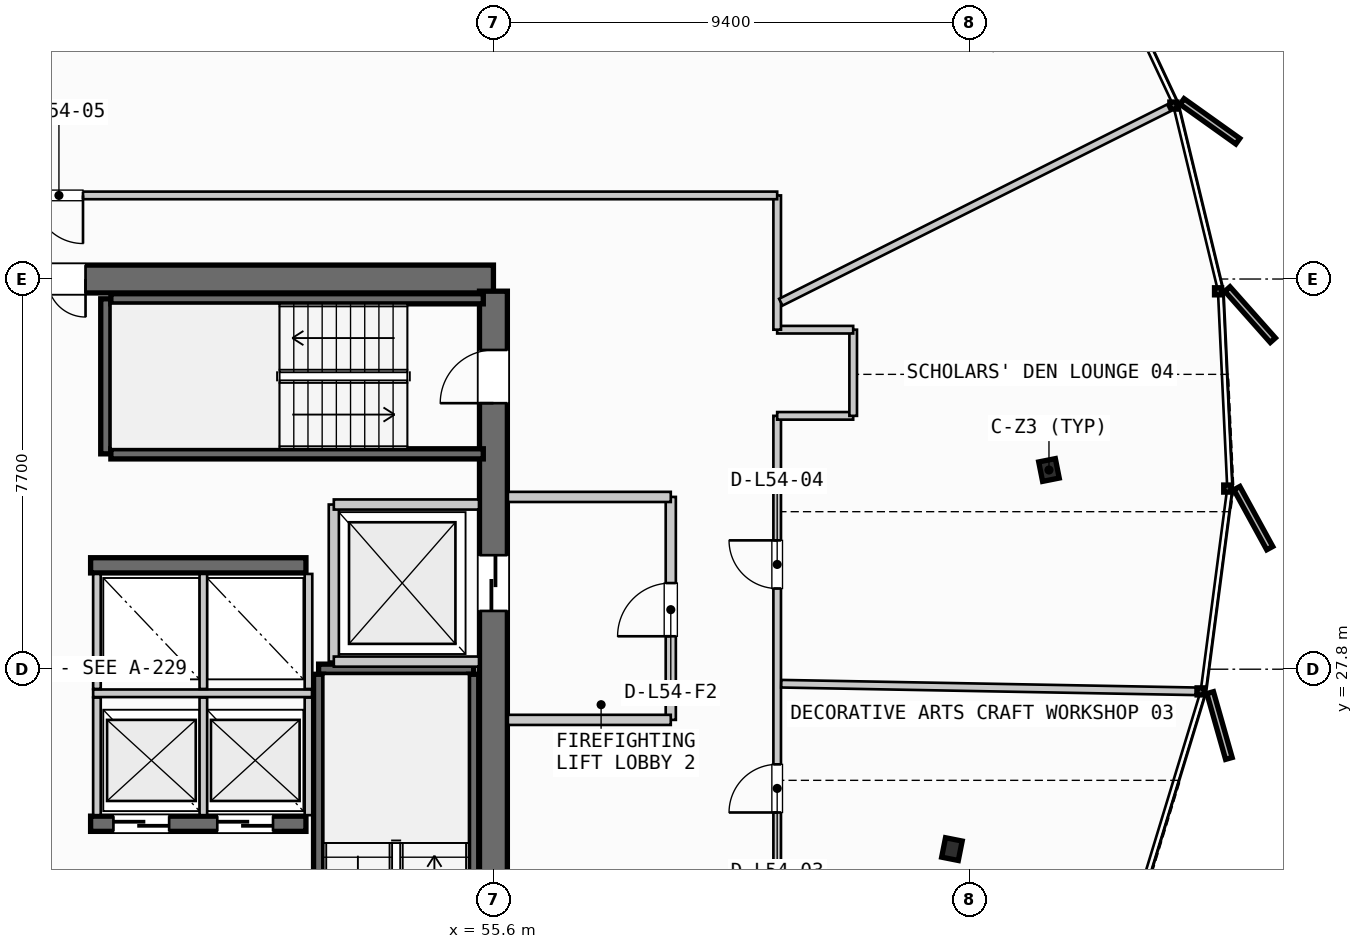
"""IFC4 building model, lengths in metres.
Left out: names, types, materials, properties, quantities, classifications, styles, units other than length and angle.
Written with IfcOpenShell. Run it as: python <this file> out.ifc"""

import sys

from ifc_helpers import new_model, si_unit, direction, frame, frame_2d, origin, origin_2d, place, context, subcontext, project, spatial, rectangle, i_section, extrude, source, transform, mapped, element, fill, save


model = new_model("IFC4")
c1 = context("Model", 3, precision=1e-05, world=origin(), true_north=direction((0.0, 1.0)))
c2 = subcontext(c1, "Body", "Model", "MODEL_VIEW")
j1 = project(units=[si_unit("LENGTHUNIT", "METRE"), si_unit("PLANEANGLEUNIT", "RADIAN")], contexts=[c1])
p1 = place(None, origin())
s1 = spatial("IfcSite", under=j1, at=p1, CompositionType="ELEMENT")
p2 = place(p1, origin())
s2 = spatial("IfcBuilding", under=s1, at=p2, CompositionType="ELEMENT")
p3 = place(p2, frame((0.0, 0.0, 207.9)))
s3 = spatial("IfcBuildingStorey", under=s2, at=p3, CompositionType="ELEMENT", Elevation=207.9)
p4 = place(p3, frame((55.6, 35.5, 0.0), z_axis=(0.0, 0.0, 1.0), x_axis=(-1.0, 0.0, 0.0)))
e1 = element("IfcWall", 1, at=p4, inside=s3, PredefinedType="SHEAR", context=c2, shape_type="SweptSolid", body=[
    extrude(rectangle(XDim=17.6, YDim=0.55, at=frame_2d((8.8, 0.0))), origin(), (0.0, 0.0, 1.0), 3.26),
])
p5 = place(p4, frame((8.05, 0.0, 0.0)))
e2 = element("IfcOpeningElement", 2, at=p5, cuts=e1, PredefinedType="OPENING", context=c2, shape_type="SweptSolid", body=[
    extrude(rectangle(XDim=1.5, YDim=2.2, at=frame_2d((0.75, 1.1))), frame((0.0, 0.285, 0.0), z_axis=(0.0, -1.0, 0.0), x_axis=(1.0, 0.0, 0.0)), (0.0, 0.0, 1.0), 0.57),
])
p6 = place(p4, frame((15.85, 0.0, 0.0)))
e3 = element("IfcOpeningElement", 3, at=p6, cuts=e1, PredefinedType="OPENING", context=c2, shape_type="SweptSolid", body=[
    extrude(rectangle(XDim=0.85, YDim=2.15, at=frame_2d((0.425, 1.075))), frame((0.0, 0.285, 0.0), z_axis=(0.0, -1.0, 0.0), x_axis=(1.0, 0.0, 0.0)), (0.0, 0.0, 1.0), 0.57),
])
p7 = place(p4, frame((14.35, 0.0, 0.0)))
e4 = element("IfcOpeningElement", 4, at=p7, cuts=e1, PredefinedType="OPENING", context=c2, shape_type="SweptSolid", body=[
    extrude(rectangle(XDim=0.85, YDim=2.15, at=frame_2d((0.425, 1.075))), frame((0.0, 0.285, 0.0), z_axis=(0.0, -1.0, 0.0), x_axis=(1.0, 0.0, 0.0)), (0.0, 0.0, 1.0), 0.57),
])
p8 = place(p4, frame((12.3, 0.0, 0.0)))
e5 = element("IfcOpeningElement", 5, at=p8, cuts=e1, PredefinedType="OPENING", context=c2, shape_type="SweptSolid", body=[
    extrude(rectangle(XDim=0.95, YDim=2.15, at=frame_2d((0.475, 1.075))), frame((0.0, 0.285, 0.0), z_axis=(0.0, -1.0, 0.0), x_axis=(1.0, 0.0, 0.0)), (0.0, 0.0, 1.0), 0.57),
])
p9 = place(p4, frame((10.2, 0.0, 0.0)))
e6 = element("IfcOpeningElement", 6, at=p9, cuts=e1, PredefinedType="OPENING", context=c2, shape_type="SweptSolid", body=[
    extrude(rectangle(XDim=0.9, YDim=2.15, at=frame_2d((0.45, 1.075))), frame((0.0, 0.285, 0.0), z_axis=(0.0, -1.0, 0.0), x_axis=(1.0, 0.0, 0.0)), (0.0, 0.0, 1.0), 0.57),
])
p10 = place(p3, frame((55.6, 20.34, 0.0), z_axis=(0.0, 0.0, 1.0), x_axis=(0.0, 1.0, 0.0)))
e7 = element("IfcWall", 7, at=p10, inside=s3, PredefinedType="SHEAR", context=c2, shape_type="SweptSolid", body=[
    extrude(rectangle(XDim=14.92, YDim=0.55, at=frame_2d((7.46, 0.0))), origin(), (0.0, 0.0, 1.0), 3.26),
])
p11 = place(p10, frame((12.71, 0.0, 0.0)))
e8 = element("IfcOpeningElement", 8, at=p11, cuts=e7, PredefinedType="OPENING", context=c2, shape_type="SweptSolid", body=[
    extrude(rectangle(XDim=1.05, YDim=2.15, at=frame_2d((0.525, 1.075))), frame((0.0, 0.285, 0.0), z_axis=(0.0, -1.0, 0.0), x_axis=(1.0, 0.0, 0.0)), (0.0, 0.0, 1.0), 0.57),
])
p12 = place(p10, frame((8.61, 0.0, 0.0)))
e9 = element("IfcOpeningElement", 9, at=p12, cuts=e7, PredefinedType="OPENING", context=c2, shape_type="SweptSolid", body=[
    extrude(rectangle(XDim=1.1, YDim=2.2, at=frame_2d((0.55, 1.1))), frame((0.0, 0.285, 0.0), z_axis=(0.0, -1.0, 0.0), x_axis=(1.0, 0.0, 0.0)), (0.0, 0.0, 1.0), 0.57),
])
p13 = place(p3, frame((47.65, 24.75, 0.0), z_axis=(0.0, 0.0, 1.0), x_axis=(1.0, 0.0, 0.0)))
e10 = element("IfcWall", 10, at=p13, inside=s3, PredefinedType="SHEAR", context=c2, shape_type="SweptSolid", body=[
    extrude(rectangle(XDim=4.25, YDim=0.3, at=frame_2d((2.125, 0.0))), origin(), (0.0, 0.0, 1.0), 3.26),
])
p14 = place(p13, frame((0.45, 0.0, 0.0)))
e11 = element("IfcOpeningElement", 11, at=p14, cuts=e10, PredefinedType="OPENING", context=c2, shape_type="SweptSolid", body=[
    extrude(rectangle(XDim=1.1, YDim=2.2, at=frame_2d((0.55, 1.1))), frame((0.0, 0.16, 0.0), z_axis=(0.0, -1.0, 0.0), x_axis=(1.0, 0.0, 0.0)), (0.0, 0.0, 1.0), 0.32),
])
p15 = place(p13, frame((2.5, 0.0, 0.0)))
e12 = element("IfcOpeningElement", 12, at=p15, cuts=e10, PredefinedType="OPENING", context=c2, shape_type="SweptSolid", body=[
    extrude(rectangle(XDim=1.1, YDim=2.2, at=frame_2d((0.55, 1.1))), frame((0.0, 0.16, 0.0), z_axis=(0.0, -1.0, 0.0), x_axis=(1.0, 0.0, 0.0)), (0.0, 0.0, 1.0), 0.32),
])
p16 = place(p3, frame((47.65, 29.85, 0.0), z_axis=(0.0, 0.0, 1.0), x_axis=(1.0, 0.0, 0.0)))
e13 = element("IfcWall", 13, at=p16, inside=s3, PredefinedType="SHEAR", context=c2, shape_type="SweptSolid", body=[
    extrude(rectangle(XDim=4.25, YDim=0.3, at=frame_2d((2.125, 0.0))), origin(), (0.0, 0.0, 1.0), 3.26),
])
m1 = source(origin(), c2, "Body", "SweptSolid", [
    extrude(i_section(OverallWidth=0.391, OverallDepth=0.335, WebThickness=0.023, FlangeThickness=0.034, FilletRadius=0.015, at=origin_2d()), origin(), (0.0, 0.0, 1.0), 3.26),
])
for number, where, z_axis, x_axis in (
    (14, (66.564, 31.731, 0.0), (0.0, 0.0, 1.0), (0.981, 0.195, 0.0)),
    (15, (64.649, 24.25, 0.0), (0.0, 0.0, 1.0), (0.981, -0.195, 0.0)),
):
    element("IfcColumn", number, at=place(p3, frame(where, z_axis=z_axis, x_axis=x_axis)), inside=s3, PredefinedType="COLUMN", context=c2, shape_type="MappedRepresentation", body=[
        mapped(m1, transform((0.0, 0.0, 0.0), scale=1.0)),
    ])
p17 = place(p3, frame((52.15, 27.8, 0.0), z_axis=(0.0, 0.0, 1.0), x_axis=(1.0, 0.0, 0.0)))
e16 = element("IfcWall", 16, at=p17, inside=s3, PredefinedType="SHEAR", context=c2, shape_type="SweptSolid", body=[
    extrude(rectangle(XDim=3.06, YDim=0.2, at=frame_2d((1.53, 0.0))), origin(), (0.0, 0.0, 1.0), 3.26),
])
for number, where, z_axis, x_axis in (
    (17, (55.21, 27.7, 0.0), (0.0, 0.0, 1.0), (0.0, -1.0, 0.0)),
    (18, (52.15, 20.35, 0.0), (0.0, 0.0, 1.0), (0.0, 1.0, 0.0)),
):
    element("IfcWall", number, at=place(p3, frame(where, z_axis=z_axis, x_axis=x_axis)), inside=s3, PredefinedType="SHEAR", context=c2, shape_type="SweptSolid", body=[
        extrude(rectangle(XDim=7.35, YDim=0.2, at=frame_2d((3.675, 0.0))), origin(), (0.0, 0.0, 1.0), 3.26),
    ])
p18 = place(p3, frame((47.95, 32.05, 0.0), z_axis=(0.0, 0.0, 1.0), x_axis=(0.0, 1.0, 0.0)))
e19 = element("IfcWall", 19, at=p18, inside=s3, PredefinedType="SHEAR", context=c2, shape_type="SweptSolid", body=[
    extrude(rectangle(XDim=3.06, YDim=0.2, at=frame_2d((1.53, 0.0))), origin(), (0.0, 0.0, 1.0), 3.26),
])
for number, where, z_axis, x_axis in (
    (20, (48.05, 35.11, 0.0), (0.0, 0.0, 1.0), (1.0, 0.0, 0.0)),
    (21, (55.4, 32.05, 0.0), (0.0, 0.0, 1.0), (-1.0, 0.0, 0.0)),
):
    element("IfcWall", number, at=place(p3, frame(where, z_axis=z_axis, x_axis=x_axis)), inside=s3, PredefinedType="SHEAR", context=c2, shape_type="SweptSolid", body=[
        extrude(rectangle(XDim=7.35, YDim=0.2, at=frame_2d((3.675, 0.0))), origin(), (0.0, 0.0, 1.0), 3.26),
    ])
p19 = place(p3, frame((52.45, 27.95, 0.0), z_axis=(0.0, 0.0, 1.0), x_axis=(0.0, 1.0, 0.0)))
e22 = element("IfcWall", 22, at=p19, inside=s3, PredefinedType="PARTITIONING", context=c2, shape_type="SweptSolid", body=[
    extrude(rectangle(XDim=3.1, YDim=0.2, at=frame_2d((1.55, 0.0))), origin(), (0.0, 0.0, 1.0), 2.455),
])
for number, where, z_axis, x_axis in (
    (23, (52.45, 27.95, 0.0), (0.0, 0.0, 1.0), (1.0, 0.0, 0.0)),
    (24, (52.45, 31.05, 0.0), (0.0, 0.0, 1.0), (1.0, 0.0, 0.0)),
):
    element("IfcWall", number, at=place(p3, frame(where, z_axis=z_axis, x_axis=x_axis)), inside=s3, PredefinedType="PARTITIONING", context=c2, shape_type="SweptSolid", body=[
        extrude(rectangle(XDim=2.865, YDim=0.2, at=frame_2d((1.433, 0.0))), origin(), (0.0, 0.0, 1.0), 2.455),
    ])
p20 = place(p3, frame((59.1, 26.8, 0.0), z_axis=(0.0, 0.0, 1.0), x_axis=(0.0, 1.0, 0.0)))
e25 = element("IfcWall", 25, at=p20, inside=s3, PredefinedType="PARTITIONING", context=c2, shape_type="SweptSolid", body=[
    extrude(rectangle(XDim=4.4, YDim=0.2, at=frame_2d((2.2, 0.0))), origin(), (0.0, 0.0, 1.0), 2.455),
])
p21 = place(p20, frame((1.65, 0.0, 0.0)))
e26 = element("IfcOpeningElement", 26, at=p21, cuts=e25, PredefinedType="OPENING", context=c2, shape_type="SweptSolid", body=[
    extrude(rectangle(XDim=1.05, YDim=2.15, at=frame_2d((0.525, 1.075))), frame((0.0, 0.11, 0.0), z_axis=(0.0, -1.0, 0.0), x_axis=(1.0, 0.0, 0.0)), (0.0, 0.0, 1.0), 0.22),
])
for number, where, z_axis, x_axis in (
    (27, (55.885, 26.8, 0.0), (0.0, 0.0, 1.0), (1.0, 0.0, 0.0)),
    (28, (55.885, 31.2, 0.0), (0.0, 0.0, 1.0), (1.0, 0.0, 0.0)),
):
    element("IfcWall", number, at=place(p3, frame(where, z_axis=z_axis, x_axis=x_axis)), inside=s3, PredefinedType="PARTITIONING", context=c2, shape_type="SweptSolid", body=[
        extrude(rectangle(XDim=3.215, YDim=0.2, at=frame_2d((1.607, 0.0))), origin(), (0.0, 0.0, 1.0), 2.455),
    ])
p22 = place(p3, frame((47.7, 27.325, 0.0), z_axis=(0.0, 0.0, 1.0), x_axis=(1.0, 0.0, 0.0)))
e29 = element("IfcWall", 29, at=p22, inside=s3, PredefinedType="PARTITIONING", context=c2, shape_type="SweptSolid", body=[
    extrude(rectangle(XDim=4.32, YDim=0.15, at=frame_2d((2.16, 0.0))), origin(), (0.0, 0.0, 1.0), 2.455),
])
for number, where, z_axis, x_axis in (
    (30, (47.775, 24.92, 0.0), (0.0, 0.0, 1.0), (0.0, 1.0, 0.0)),
    (31, (49.875, 24.92, 0.0), (0.0, 0.0, 1.0), (0.0, 1.0, 0.0)),
    (32, (51.95, 24.92, 0.0), (0.0, 0.0, 1.0), (0.0, 1.0, 0.0)),
):
    element("IfcWall", number, at=place(p3, frame(where, z_axis=z_axis, x_axis=x_axis)), inside=s3, PredefinedType="PARTITIONING", context=c2, shape_type="SweptSolid", body=[
        extrude(rectangle(XDim=2.32, YDim=0.15, at=frame_2d((1.16, 0.0))), origin(), (0.0, 0.0, 1.0), 2.455),
    ])
for number, where, z_axis, x_axis in (
    (33, (47.775, 27.41, 0.0), (0.0, 0.0, 1.0), (0.0, 1.0, 0.0)),
    (34, (49.875, 27.41, 0.0), (0.0, 0.0, 1.0), (0.0, 1.0, 0.0)),
    (35, (51.95, 27.41, 0.0), (0.0, 0.0, 1.0), (0.0, 1.0, 0.0)),
):
    element("IfcWall", number, at=place(p3, frame(where, z_axis=z_axis, x_axis=x_axis)), inside=s3, PredefinedType="PARTITIONING", context=c2, shape_type="SweptSolid", body=[
        extrude(rectangle(XDim=2.27, YDim=0.15, at=frame_2d((1.135, 0.0))), origin(), (0.0, 0.0, 1.0), 2.455),
    ])
p23 = place(p3, frame((61.2, 22.8, 0.0), z_axis=(0.0, 0.0, 1.0), x_axis=(0.0, 1.0, 0.0)))
e36 = element("IfcWall", 36, at=p23, inside=s3, PredefinedType="PARTITIONING", context=c2, shape_type="SweptSolid", body=[
    extrude(rectangle(XDim=10.0, YDim=0.15, at=frame_2d((5.0, 0.0))), origin(), (0.0, 0.0, 1.0), 2.455),
])
p24 = place(p23, frame((2.173, 0.0, 0.0)))
e37 = element("IfcOpeningElement", 37, at=p24, cuts=e36, PredefinedType="OPENING", context=c2, shape_type="SweptSolid", body=[
    extrude(rectangle(XDim=0.95, YDim=2.15, at=frame_2d((0.475, 1.075))), frame((0.0, 0.085, 0.0), z_axis=(0.0, -1.0, 0.0), x_axis=(1.0, 0.0, 0.0)), (0.0, 0.0, 1.0), 0.17),
])
p25 = place(p23, frame((6.593, 0.0, 0.0)))
e38 = element("IfcOpeningElement", 38, at=p25, cuts=e36, PredefinedType="OPENING", context=c2, shape_type="SweptSolid", body=[
    extrude(rectangle(XDim=0.95, YDim=2.15, at=frame_2d((0.475, 1.075))), frame((0.0, 0.085, 0.0), z_axis=(0.0, -1.0, 0.0), x_axis=(1.0, 0.0, 0.0)), (0.0, 0.0, 1.0), 0.17),
])
p26 = place(p3, frame((61.2, 32.8, 0.0), z_axis=(0.0, 0.0, 1.0), x_axis=(1.0, 0.0, 0.0)))
e39 = element("IfcWall", 39, at=p26, inside=s3, PredefinedType="PARTITIONING", context=c2, shape_type="SweptSolid", body=[
    extrude(rectangle(XDim=1.5, YDim=0.15, at=frame_2d((0.75, 0.0))), origin(), (0.0, 0.0, 1.0), 2.455),
])
p27 = place(p3, frame((62.7, 32.8, 0.0), z_axis=(0.0, 0.0, 1.0), x_axis=(0.0, 1.0, 0.0)))
e40 = element("IfcWall", 40, at=p27, inside=s3, PredefinedType="PARTITIONING", context=c2, shape_type="SweptSolid", body=[
    extrude(rectangle(XDim=1.7, YDim=0.15, at=frame_2d((0.85, 0.0))), origin(), (0.0, 0.0, 1.0), 2.455),
])
p28 = place(p3, frame((62.7, 34.5, 0.0), z_axis=(0.0, 0.0, 1.0), x_axis=(-1.0, 0.0, 0.0)))
e41 = element("IfcWall", 41, at=p28, inside=s3, PredefinedType="PARTITIONING", context=c2, shape_type="SweptSolid", body=[
    extrude(rectangle(XDim=1.5, YDim=0.15, at=frame_2d((0.75, 0.0))), origin(), (0.0, 0.0, 1.0), 2.455),
])
p29 = place(p3, frame((61.2, 34.5, 0.0), z_axis=(0.0, 0.0, 1.0), x_axis=(0.0, 1.0, 0.0)))
e42 = element("IfcWall", 42, at=p29, inside=s3, PredefinedType="PARTITIONING", context=c2, shape_type="SweptSolid", body=[
    extrude(rectangle(XDim=2.65, YDim=0.15, at=frame_2d((1.325, 0.0))), origin(), (0.0, 0.0, 1.0), 2.455),
])
p30 = place(p3, frame((61.2, 37.15, 0.0), z_axis=(0.0, 0.0, 1.0), x_axis=(-1.0, 0.0, 0.0)))
e43 = element("IfcWall", 43, at=p30, inside=s3, PredefinedType="PARTITIONING", context=c2, shape_type="SweptSolid", body=[
    extrude(rectangle(XDim=28.35, YDim=0.15, at=frame_2d((14.175, 0.0))), origin(), (0.0, 0.0, 1.0), 2.455),
])
p31 = place(p30, frame((13.7, 0.0, 0.0)))
e44 = element("IfcOpeningElement", 44, at=p31, cuts=e43, PredefinedType="OPENING", context=c2, shape_type="SweptSolid", body=[
    extrude(rectangle(XDim=0.95, YDim=2.15, at=frame_2d((0.475, 1.075))), frame((0.0, 0.085, 0.0), z_axis=(0.0, -1.0, 0.0), x_axis=(1.0, 0.0, 0.0)), (0.0, 0.0, 1.0), 0.17),
])
p32 = place(p3, frame((61.28, 27.514, 0.0), z_axis=(0.0, 0.0, 1.0), x_axis=(0.999832007768, -0.01832910915, 0.0)))
e45 = element("IfcWall", 45, at=p32, inside=s3, PredefinedType="PARTITIONING", context=c2, shape_type="SweptSolid", body=[
    extrude(rectangle(XDim=8.178, YDim=0.15, at=frame_2d((4.089, 0.0))), origin(), (0.0, 0.0, 1.0), 2.455),
])
p33 = place(p3, frame((61.271, 35.042, 0.0), z_axis=(0.0, 0.0, 1.0), x_axis=(0.894119133941, 0.447829179844, 0.0)))
e46 = element("IfcWall", 46, at=p33, inside=s3, PredefinedType="PARTITIONING", context=c2, shape_type="SweptSolid", body=[
    extrude(rectangle(XDim=8.565, YDim=0.15, at=frame_2d((4.283, 0.0))), origin(), (0.0, 0.0, 1.0), 2.455),
])
m2 = source(origin(), c2, "Body", "SweptSolid", [
    extrude(rectangle(XDim=1.05, YDim=2.15, at=frame_2d((0.525, 1.075))), frame((0.0, 0.025, 0.0), z_axis=(0.0, -1.0, 0.0), x_axis=(1.0, 0.0, 0.0)), (0.0, 0.0, 1.0), 0.05),
])
p34 = place(p11, origin())
e47 = element("IfcDoor", 47, at=p34, inside=s3, OperationType="SINGLE_SWING_LEFT", PredefinedType="DOOR", context=c2, shape_type="MappedRepresentation", body=[
    mapped(m2, transform((0.0, 0.0, 0.0), scale=1.0)),
])
fill(e8, e47)
m3 = source(origin(), c2, "Body", "SweptSolid", [
    extrude(rectangle(XDim=1.5, YDim=2.2, at=frame_2d((0.75, 1.1))), frame((0.0, 0.025, 0.0), z_axis=(0.0, -1.0, 0.0), x_axis=(1.0, 0.0, 0.0)), (0.0, 0.0, 1.0), 0.05),
])
p35 = place(p5, origin())
e48 = element("IfcDoor", 48, at=p35, inside=s3, OperationType="DOUBLE_DOOR_SINGLE_SWING", PredefinedType="DOOR", context=c2, shape_type="MappedRepresentation", body=[
    mapped(m3, transform((0.0, 0.0, 0.0), scale=1.0)),
])
fill(e2, e48)
m4 = source(origin(), c2, "Body", "SweptSolid", [
    extrude(rectangle(XDim=1.1, YDim=2.2, at=frame_2d((0.55, 1.1))), frame((0.0, 0.025, 0.0), z_axis=(0.0, -1.0, 0.0), x_axis=(1.0, 0.0, 0.0)), (0.0, 0.0, 1.0), 0.05),
])
p36 = place(p12, origin())
e49 = element("IfcDoor", 49, at=p36, inside=s3, OperationType="SLIDING_TO_RIGHT", PredefinedType="DOOR", context=c2, shape_type="MappedRepresentation", body=[
    mapped(m4, transform((0.0, 0.0, 0.0), scale=1.0)),
])
fill(e9, e49)
p37 = place(p14, origin())
e50 = element("IfcDoor", 50, at=p37, inside=s3, OperationType="SLIDING_TO_RIGHT", PredefinedType="DOOR", context=c2, shape_type="MappedRepresentation", body=[
    mapped(m4, transform((0.0, 0.0, 0.0), scale=1.0)),
])
fill(e11, e50)
p38 = place(p15, origin())
e51 = element("IfcDoor", 51, at=p38, inside=s3, OperationType="SLIDING_TO_RIGHT", PredefinedType="DOOR", context=c2, shape_type="MappedRepresentation", body=[
    mapped(m4, transform((0.0, 0.0, 0.0), scale=1.0)),
])
fill(e12, e51)
p39 = place(p21, origin())
e52 = element("IfcDoor", 52, at=p39, inside=s3, OperationType="SINGLE_SWING_LEFT", PredefinedType="DOOR", context=c2, shape_type="MappedRepresentation", body=[
    mapped(m2, transform((0.0, 0.0, 0.0), scale=1.0)),
])
fill(e26, e52)
m5 = source(origin(), c2, "Body", "SweptSolid", [
    extrude(rectangle(XDim=0.95, YDim=2.15, at=frame_2d((0.475, 1.075))), frame((0.0, 0.025, 0.0), z_axis=(0.0, -1.0, 0.0), x_axis=(1.0, 0.0, 0.0)), (0.0, 0.0, 1.0), 0.05),
])
p40 = place(p24, origin())
e53 = element("IfcDoor", 53, at=p40, inside=s3, OperationType="SINGLE_SWING_LEFT", PredefinedType="DOOR", context=c2, shape_type="MappedRepresentation", body=[
    mapped(m5, transform((0.0, 0.0, 0.0), scale=1.0)),
])
fill(e37, e53)
p41 = place(p25, origin())
e54 = element("IfcDoor", 54, at=p41, inside=s3, OperationType="SINGLE_SWING_RIGHT", PredefinedType="DOOR", context=c2, shape_type="MappedRepresentation", body=[
    mapped(m5, transform((0.0, 0.0, 0.0), scale=1.0)),
])
fill(e38, e54)
p42 = place(p31, origin())
e55 = element("IfcDoor", 55, at=p42, inside=s3, OperationType="SINGLE_SWING_LEFT", PredefinedType="DOOR", context=c2, shape_type="MappedRepresentation", body=[
    mapped(m5, transform((0.0, 0.0, 0.0), scale=1.0)),
])
fill(e44, e55)
save(model, sys.argv[1])
